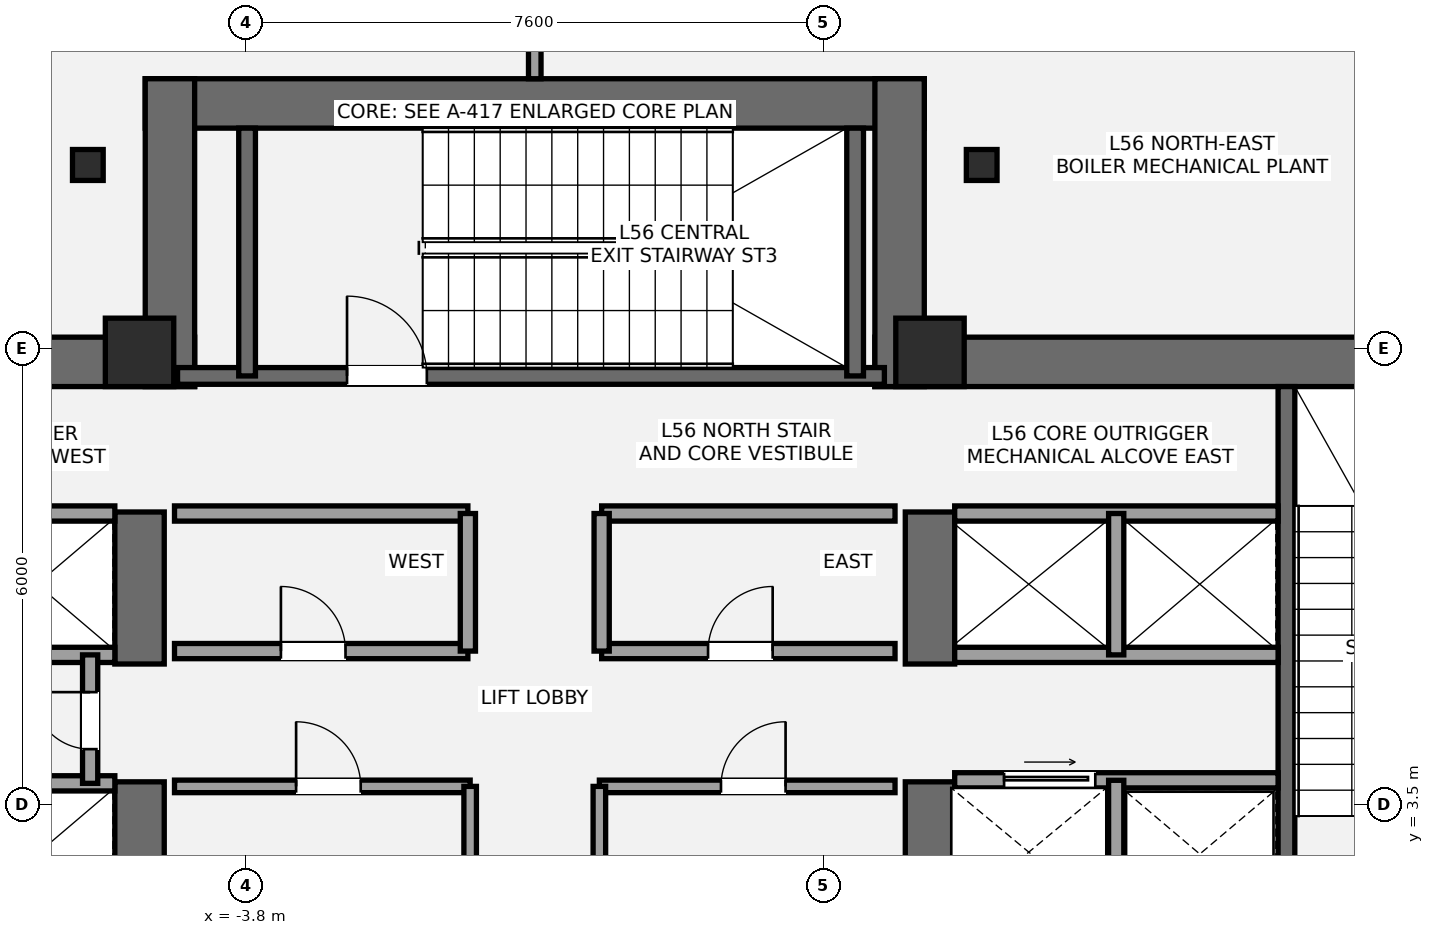
"""IFC4 building model, lengths in metres.
Left out: names, types, materials, properties, quantities, classifications, styles, units other than length and angle.
Written with IfcOpenShell. Run it as: python <this file> out.ifc"""

import sys

from ifc_helpers import new_model, si_unit, direction, frame, frame_2d, origin, origin_2d, place, context, subcontext, project, spatial, rectangle, i_section, extrude, element, fill, save


model = new_model("IFC4")
c1 = context("Model", 3, precision=1e-05, world=origin(), true_north=direction((0.0, 1.0)))
c2 = subcontext(c1, "Body", "Model", "MODEL_VIEW")
j1 = project(units=[si_unit("LENGTHUNIT", "METRE"), si_unit("PLANEANGLEUNIT", "RADIAN")], contexts=[c1])
p1 = place(None, origin())
s1 = spatial("IfcSite", under=j1, at=p1, CompositionType="ELEMENT")
p2 = place(p1, origin())
s2 = spatial("IfcBuilding", under=s1, at=p2, CompositionType="ELEMENT")
p3 = place(p2, frame((0.0, 0.0, 201.4)))
s3 = spatial("IfcBuildingStorey", under=s2, at=p3, CompositionType="ELEMENT", Elevation=201.4)
p4 = place(p3, frame((-13.8, 9.325, 0.0), z_axis=(0.0, 0.0, 1.0), x_axis=(1.0, 0.0, 0.0)))
e1 = element("IfcWall", 1, at=p4, inside=s3, PredefinedType="SHEAR", context=c2, shape_type="SweptSolid", body=[
    extrude(rectangle(XDim=9.325, YDim=0.65, at=frame_2d((4.663, 0.0))), origin(), (0.0, 0.0, 1.0), 4.5),
])
p5 = place(p3, frame((-5.2, 1.2, 0.0), z_axis=(0.0, 0.0, 1.0), x_axis=(0.0, 1.0, 0.0)))
e2 = element("IfcWall", 2, at=p5, inside=s3, PredefinedType="SHEAR", context=c2, shape_type="SweptSolid", body=[
    extrude(rectangle(XDim=2.6, YDim=0.65, at=frame_2d((1.3, 0.0))), origin(), (0.0, 0.0, 1.0), 4.5),
])
p6 = place(p3, frame((-5.2, 5.35, 0.0), z_axis=(0.0, 0.0, 1.0), x_axis=(0.0, 1.0, 0.0)))
e3 = element("IfcWall", 3, at=p6, inside=s3, PredefinedType="SHEAR", context=c2, shape_type="SweptSolid", body=[
    extrude(rectangle(XDim=2.0, YDim=0.65, at=frame_2d((1.0, 0.0))), origin(), (0.0, 0.0, 1.0), 4.5),
])
p7 = place(p3, frame((4.475, 9.325, 0.0), z_axis=(0.0, 0.0, 1.0), x_axis=(1.0, 0.0, 0.0)))
e4 = element("IfcWall", 4, at=p7, inside=s3, PredefinedType="SHEAR", context=c2, shape_type="SweptSolid", body=[
    extrude(rectangle(XDim=9.325, YDim=0.65, at=frame_2d((4.663, 0.0))), origin(), (0.0, 0.0, 1.0), 4.5),
])
p8 = place(p3, frame((5.2, 1.2, 0.0), z_axis=(0.0, 0.0, 1.0), x_axis=(0.0, 1.0, 0.0)))
e5 = element("IfcWall", 5, at=p8, inside=s3, PredefinedType="SHEAR", context=c2, shape_type="SweptSolid", body=[
    extrude(rectangle(XDim=2.6, YDim=0.65, at=frame_2d((1.3, 0.0))), origin(), (0.0, 0.0, 1.0), 4.5),
])
p9 = place(p3, frame((5.2, 5.35, 0.0), z_axis=(0.0, 0.0, 1.0), x_axis=(0.0, 1.0, 0.0)))
e6 = element("IfcWall", 6, at=p9, inside=s3, PredefinedType="SHEAR", context=c2, shape_type="SweptSolid", body=[
    extrude(rectangle(XDim=2.0, YDim=0.65, at=frame_2d((1.0, 0.0))), origin(), (0.0, 0.0, 1.0), 4.5),
])
p10 = place(p3, frame((9.89, 1.85, 0.0), z_axis=(0.0, 0.0, 1.0), x_axis=(0.0, 1.0, 0.0)))
e7 = element("IfcWall", 7, at=p10, inside=s3, PredefinedType="SHEAR", context=c2, shape_type="SweptSolid", body=[
    extrude(rectangle(XDim=7.15, YDim=0.22, at=frame_2d((3.575, 0.0))), origin(), (0.0, 0.0, 1.0), 4.5),
])
p11 = place(p3, frame((-5.125, 12.725, 0.0), z_axis=(0.0, 0.0, 1.0), x_axis=(1.0, 0.0, 0.0)))
e8 = element("IfcWall", 8, at=p11, inside=s3, PredefinedType="SHEAR", context=c2, shape_type="SweptSolid", body=[
    extrude(rectangle(XDim=10.25, YDim=0.65, at=frame_2d((5.125, 0.0))), origin(), (0.0, 0.0, 1.0), 4.5),
])
for number, where, z_axis, x_axis in (
    (9, (-4.8, 9.0, 0.0), (0.0, 0.0, 1.0), (0.0, 1.0, 0.0)),
    (10, (4.8, 9.0, 0.0), (0.0, 0.0, 1.0), (0.0, 1.0, 0.0)),
):
    element("IfcWall", number, at=place(p3, frame(where, z_axis=z_axis, x_axis=x_axis)), inside=s3, PredefinedType="SHEAR", context=c2, shape_type="SweptSolid", body=[
        extrude(rectangle(XDim=4.05, YDim=0.65, at=frame_2d((2.025, 0.0))), origin(), (0.0, 0.0, 1.0), 4.5),
    ])
p12 = place(p3, frame((-4.7, 9.14, 0.0), z_axis=(0.0, 0.0, 1.0), x_axis=(1.0, 0.0, 0.0)))
e11 = element("IfcWall", 11, at=p12, inside=s3, PredefinedType="SHEAR", context=c2, shape_type="SweptSolid", body=[
    extrude(rectangle(XDim=9.3, YDim=0.22, at=frame_2d((4.65, 0.0))), origin(), (0.0, 0.0, 1.0), 4.5),
])
p13 = place(p12, frame((2.23, 0.0, 0.0)))
e12 = element("IfcOpeningElement", 12, at=p13, cuts=e11, PredefinedType="OPENING", context=c2, shape_type="SweptSolid", body=[
    extrude(rectangle(XDim=1.05, YDim=2.15, at=frame_2d((0.525, 1.075))), frame((0.0, 0.12, 0.0), z_axis=(0.0, -1.0, 0.0), x_axis=(1.0, 0.0, 0.0)), (0.0, 0.0, 1.0), 0.24),
])
for number, where, z_axis, x_axis in (
    (13, (-3.785, 9.14, 0.0), (0.0, 0.0, 1.0), (0.0, 1.0, 0.0)),
    (14, (4.215, 9.14, 0.0), (0.0, 0.0, 1.0), (0.0, 1.0, 0.0)),
):
    element("IfcWall", number, at=place(p3, frame(where, z_axis=z_axis, x_axis=x_axis)), inside=s3, PredefinedType="SHEAR", context=c2, shape_type="SweptSolid", body=[
        extrude(rectangle(XDim=3.26, YDim=0.22, at=frame_2d((1.63, 0.0))), origin(), (0.0, 0.0, 1.0), 4.5),
    ])
for number, where, z_axis, x_axis in (
    (15, (-5.2, 9.45, 0.0), (0.0, 0.0, 1.0), (1.0, 0.0, 0.0)),
    (16, (5.2, 9.45, 0.0), (0.0, 0.0, 1.0), (1.0, 0.0, 0.0)),
):
    element("IfcColumn", number, at=place(p3, frame(where, z_axis=z_axis, x_axis=x_axis)), inside=s3, PredefinedType="COLUMN", context=c2, shape_type="SweptSolid", body=[
        extrude(rectangle(XDim=0.9, YDim=0.9, at=origin_2d()), origin(), (0.0, 0.0, 1.0), 4.5),
    ])
for number, where, z_axis, x_axis in (
    (17, (5.88, 11.915, 0.0), (0.0, 0.0, 1.0), (1.0, 0.0, 0.0)),
    (18, (-5.88, 11.915, 0.0), (0.0, 0.0, 1.0), (1.0, 0.0, 0.0)),
):
    element("IfcColumn", number, at=place(p3, frame(where, z_axis=z_axis, x_axis=x_axis)), inside=s3, PredefinedType="COLUMN", context=c2, shape_type="SweptSolid", body=[
        extrude(i_section(OverallWidth=0.404, OverallDepth=0.407, WebThickness=0.027, FlangeThickness=0.044, at=origin_2d()), origin(), (0.0, 0.0, 1.0), 4.5),
    ])
for number, where, z_axis, x_axis in (
    (19, (-9.78, 3.78, 0.0), (0.0, 0.0, 1.0), (1.0, 0.0, 0.0)),
    (20, (-9.78, 5.47, 0.0), (0.0, 0.0, 1.0), (1.0, 0.0, 0.0)),
    (21, (-9.78, 7.33, 0.0), (0.0, 0.0, 1.0), (1.0, 0.0, 0.0)),
):
    element("IfcWall", number, at=place(p3, frame(where, z_axis=z_axis, x_axis=x_axis)), inside=s3, PredefinedType="SOLIDWALL", context=c2, shape_type="SweptSolid", body=[
        extrude(rectangle(XDim=4.255, YDim=0.2, at=frame_2d((2.127, 0.0))), origin(), (0.0, 0.0, 1.0), 4.28),
    ])
p14 = place(p3, frame((-5.85, 3.78, 0.0), z_axis=(0.0, 0.0, 1.0), x_axis=(0.0, 1.0, 0.0)))
e22 = element("IfcWall", 22, at=p14, inside=s3, PredefinedType="SOLIDWALL", context=c2, shape_type="SweptSolid", body=[
    extrude(rectangle(XDim=1.69, YDim=0.2, at=frame_2d((0.845, 0.0))), origin(), (0.0, 0.0, 1.0), 4.28),
])
p15 = place(p14, frame((0.45, 0.0, 0.0)))
e23 = element("IfcOpeningElement", 23, at=p15, cuts=e22, PredefinedType="OPENING", context=c2, shape_type="SweptSolid", body=[
    extrude(rectangle(XDim=0.75, YDim=2.1, at=frame_2d((0.375, 1.05))), frame((0.0, 0.11, 0.0), z_axis=(0.0, -1.0, 0.0), x_axis=(1.0, 0.0, 0.0)), (0.0, 0.0, 1.0), 0.22),
])
p16 = place(p3, frame((5.525, 3.82, 0.0), z_axis=(0.0, 0.0, 1.0), x_axis=(1.0, 0.0, 0.0)))
e24 = element("IfcWall", 24, at=p16, inside=s3, PredefinedType="SOLIDWALL", context=c2, shape_type="SweptSolid", body=[
    extrude(rectangle(XDim=4.255, YDim=0.2, at=frame_2d((2.127, 0.0))), origin(), (0.0, 0.0, 1.0), 4.28),
])
p17 = place(p16, frame((0.65, 0.0, 0.0)))
e25 = element("IfcOpeningElement", 25, at=p17, cuts=e24, PredefinedType="OPENING", context=c2, shape_type="SweptSolid", body=[
    extrude(rectangle(XDim=1.2, YDim=2.2, at=frame_2d((0.6, 1.1))), frame((0.0, 0.11, 0.0), z_axis=(0.0, -1.0, 0.0), x_axis=(1.0, 0.0, 0.0)), (0.0, 0.0, 1.0), 0.22),
])
p18 = place(p3, frame((7.65, 1.85, 0.0), z_axis=(0.0, 0.0, 1.0), x_axis=(0.0, 1.0, 0.0)))
e26 = element("IfcWall", 26, at=p18, inside=s3, PredefinedType="SOLIDWALL", context=c2, shape_type="SweptSolid", body=[
    extrude(rectangle(XDim=1.97, YDim=0.2, at=frame_2d((0.985, 0.0))), origin(), (0.0, 0.0, 1.0), 4.28),
])
for number, where, z_axis, x_axis in (
    (27, (5.525, 5.47, 0.0), (0.0, 0.0, 1.0), (1.0, 0.0, 0.0)),
    (28, (5.525, 7.33, 0.0), (0.0, 0.0, 1.0), (1.0, 0.0, 0.0)),
):
    element("IfcWall", number, at=place(p3, frame(where, z_axis=z_axis, x_axis=x_axis)), inside=s3, PredefinedType="SOLIDWALL", context=c2, shape_type="SweptSolid", body=[
        extrude(rectangle(XDim=4.255, YDim=0.2, at=frame_2d((2.127, 0.0))), origin(), (0.0, 0.0, 1.0), 4.28),
    ])
p19 = place(p3, frame((7.65, 5.47, 0.0), z_axis=(0.0, 0.0, 1.0), x_axis=(0.0, 1.0, 0.0)))
e29 = element("IfcWall", 29, at=p19, inside=s3, PredefinedType="SOLIDWALL", context=c2, shape_type="SweptSolid", body=[
    extrude(rectangle(XDim=1.86, YDim=0.2, at=frame_2d((0.93, 0.0))), origin(), (0.0, 0.0, 1.0), 4.28),
])
p20 = place(p3, frame((-4.74, 3.74, 0.0), z_axis=(0.0, 0.0, 1.0), x_axis=(1.0, 0.0, 0.0)))
e30 = element("IfcWall", 30, at=p20, inside=s3, PredefinedType="PARTITIONING", context=c2, shape_type="SweptSolid", body=[
    extrude(rectangle(XDim=3.89, YDim=0.165, at=frame_2d((1.945, 0.0))), origin(), (0.0, 0.0, 1.0), 4.28),
])
p21 = place(p20, frame((1.6, 0.0, 0.0)))
e31 = element("IfcOpeningElement", 31, at=p21, cuts=e30, PredefinedType="OPENING", context=c2, shape_type="SweptSolid", body=[
    extrude(rectangle(XDim=0.85, YDim=2.1, at=frame_2d((0.425, 1.05))), frame((0.0, 0.093, 0.0), z_axis=(0.0, -1.0, 0.0), x_axis=(1.0, 0.0, 0.0)), (0.0, 0.0, 1.0), 0.185),
])
p22 = place(p3, frame((-0.85, 1.92, 0.0), z_axis=(0.0, 0.0, 1.0), x_axis=(0.0, 1.0, 0.0)))
e32 = element("IfcWall", 32, at=p22, inside=s3, PredefinedType="PARTITIONING", context=c2, shape_type="SweptSolid", body=[
    extrude(rectangle(XDim=1.82, YDim=0.165, at=frame_2d((0.91, 0.0))), origin(), (0.0, 0.0, 1.0), 4.28),
])
p23 = place(p3, frame((0.85, 3.74, 0.0), z_axis=(0.0, 0.0, 1.0), x_axis=(1.0, 0.0, 0.0)))
e33 = element("IfcWall", 33, at=p23, inside=s3, PredefinedType="PARTITIONING", context=c2, shape_type="SweptSolid", body=[
    extrude(rectangle(XDim=3.89, YDim=0.165, at=frame_2d((1.945, 0.0))), origin(), (0.0, 0.0, 1.0), 4.28),
])
p24 = place(p23, frame((1.6, 0.0, 0.0)))
e34 = element("IfcOpeningElement", 34, at=p24, cuts=e33, PredefinedType="OPENING", context=c2, shape_type="SweptSolid", body=[
    extrude(rectangle(XDim=0.85, YDim=2.1, at=frame_2d((0.425, 1.05))), frame((0.0, 0.093, 0.0), z_axis=(0.0, -1.0, 0.0), x_axis=(1.0, 0.0, 0.0)), (0.0, 0.0, 1.0), 0.185),
])
p25 = place(p3, frame((0.85, 1.92, 0.0), z_axis=(0.0, 0.0, 1.0), x_axis=(0.0, 1.0, 0.0)))
e35 = element("IfcWall", 35, at=p25, inside=s3, PredefinedType="PARTITIONING", context=c2, shape_type="SweptSolid", body=[
    extrude(rectangle(XDim=1.82, YDim=0.165, at=frame_2d((0.91, 0.0))), origin(), (0.0, 0.0, 1.0), 4.28),
])
p26 = place(p3, frame((-4.74, 5.52, 0.0), z_axis=(0.0, 0.0, 1.0), x_axis=(1.0, 0.0, 0.0)))
e36 = element("IfcWall", 36, at=p26, inside=s3, PredefinedType="SOLIDWALL", context=c2, shape_type="SweptSolid", body=[
    extrude(rectangle(XDim=3.86, YDim=0.2, at=frame_2d((1.93, 0.0))), origin(), (0.0, 0.0, 1.0), 4.28),
])
p27 = place(p26, frame((1.4, 0.0, 0.0)))
e37 = element("IfcOpeningElement", 37, at=p27, cuts=e36, PredefinedType="OPENING", context=c2, shape_type="SweptSolid", body=[
    extrude(rectangle(XDim=0.85, YDim=2.1, at=frame_2d((0.425, 1.05))), frame((0.0, 0.11, 0.0), z_axis=(0.0, -1.0, 0.0), x_axis=(1.0, 0.0, 0.0)), (0.0, 0.0, 1.0), 0.22),
])
p28 = place(p3, frame((0.88, 5.52, 0.0), z_axis=(0.0, 0.0, 1.0), x_axis=(1.0, 0.0, 0.0)))
e38 = element("IfcWall", 38, at=p28, inside=s3, PredefinedType="SOLIDWALL", context=c2, shape_type="SweptSolid", body=[
    extrude(rectangle(XDim=3.86, YDim=0.2, at=frame_2d((1.93, 0.0))), origin(), (0.0, 0.0, 1.0), 4.28),
])
p29 = place(p28, frame((1.4, 0.0, 0.0)))
e39 = element("IfcOpeningElement", 39, at=p29, cuts=e38, PredefinedType="OPENING", context=c2, shape_type="SweptSolid", body=[
    extrude(rectangle(XDim=0.85, YDim=2.1, at=frame_2d((0.425, 1.05))), frame((0.0, 0.11, 0.0), z_axis=(0.0, -1.0, 0.0), x_axis=(1.0, 0.0, 0.0)), (0.0, 0.0, 1.0), 0.22),
])
for number, where, z_axis, x_axis in (
    (40, (-4.74, 7.33, 0.0), (0.0, 0.0, 1.0), (1.0, 0.0, 0.0)),
    (41, (0.88, 7.33, 0.0), (0.0, 0.0, 1.0), (1.0, 0.0, 0.0)),
):
    element("IfcWall", number, at=place(p3, frame(where, z_axis=z_axis, x_axis=x_axis)), inside=s3, PredefinedType="SOLIDWALL", context=c2, shape_type="SweptSolid", body=[
        extrude(rectangle(XDim=3.86, YDim=0.2, at=frame_2d((1.93, 0.0))), origin(), (0.0, 0.0, 1.0), 4.28),
    ])
for number, where, z_axis, x_axis in (
    (42, (-0.88, 5.52, 0.0), (0.0, 0.0, 1.0), (0.0, 1.0, 0.0)),
    (43, (0.88, 5.52, 0.0), (0.0, 0.0, 1.0), (0.0, 1.0, 0.0)),
):
    element("IfcWall", number, at=place(p3, frame(where, z_axis=z_axis, x_axis=x_axis)), inside=s3, PredefinedType="SOLIDWALL", context=c2, shape_type="SweptSolid", body=[
        extrude(rectangle(XDim=1.81, YDim=0.2, at=frame_2d((0.905, 0.0))), origin(), (0.0, 0.0, 1.0), 4.28),
    ])
p30 = place(p3, frame((0.0, 13.05, 0.0), z_axis=(0.0, 0.0, 1.0), x_axis=(0.0, 1.0, 0.0)))
e44 = element("IfcWall", 44, at=p30, inside=s3, PredefinedType="PARTITIONING", context=c2, shape_type="SweptSolid", body=[
    extrude(rectangle(XDim=2.226, YDim=0.165, at=frame_2d((1.113, 0.0))), origin(), (0.0, 0.0, 1.0), 4.28),
])
p31 = place(p13, origin())
e45 = element("IfcDoor", 45, at=p31, inside=s3, OperationType="SINGLE_SWING_LEFT", PredefinedType="DOOR", context=c2, shape_type="SweptSolid", body=[
    extrude(rectangle(XDim=1.05, YDim=2.15, at=frame_2d((0.525, 1.075))), frame((0.0, 0.025, 0.0), z_axis=(0.0, -1.0, 0.0), x_axis=(1.0, 0.0, 0.0)), (0.0, 0.0, 1.0), 0.05),
])
fill(e12, e45)
p32 = place(p15, origin())
e46 = element("IfcDoor", 46, at=p32, inside=s3, OperationType="SINGLE_SWING_RIGHT", PredefinedType="DOOR", context=c2, shape_type="SweptSolid", body=[
    extrude(rectangle(XDim=0.75, YDim=2.1, at=frame_2d((0.375, 1.05))), frame((0.0, 0.025, 0.0), z_axis=(0.0, -1.0, 0.0), x_axis=(1.0, 0.0, 0.0)), (0.0, 0.0, 1.0), 0.05),
])
fill(e23, e46)
p33 = place(p17, origin())
e47 = element("IfcDoor", 47, at=p33, inside=s3, OperationType="SLIDING_TO_RIGHT", PredefinedType="DOOR", context=c2, shape_type="SweptSolid", body=[
    extrude(rectangle(XDim=1.2, YDim=2.2, at=frame_2d((0.6, 1.1))), frame((0.0, 0.025, 0.0), z_axis=(0.0, -1.0, 0.0), x_axis=(1.0, 0.0, 0.0)), (0.0, 0.0, 1.0), 0.05),
])
fill(e25, e47)
p34 = place(p21, origin())
e48 = element("IfcDoor", 48, at=p34, inside=s3, OperationType="SINGLE_SWING_LEFT", PredefinedType="DOOR", context=c2, shape_type="SweptSolid", body=[
    extrude(rectangle(XDim=0.85, YDim=2.1, at=frame_2d((0.425, 1.05))), frame((0.0, 0.025, 0.0), z_axis=(0.0, -1.0, 0.0), x_axis=(1.0, 0.0, 0.0)), (0.0, 0.0, 1.0), 0.05),
])
fill(e31, e48)
p35 = place(p24, origin())
e49 = element("IfcDoor", 49, at=p35, inside=s3, OperationType="SINGLE_SWING_RIGHT", PredefinedType="DOOR", context=c2, shape_type="SweptSolid", body=[
    extrude(rectangle(XDim=0.85, YDim=2.1, at=frame_2d((0.425, 1.05))), frame((0.0, 0.025, 0.0), z_axis=(0.0, -1.0, 0.0), x_axis=(1.0, 0.0, 0.0)), (0.0, 0.0, 1.0), 0.05),
])
fill(e34, e49)
p36 = place(p27, origin())
e50 = element("IfcDoor", 50, at=p36, inside=s3, OperationType="SINGLE_SWING_LEFT", PredefinedType="DOOR", context=c2, shape_type="SweptSolid", body=[
    extrude(rectangle(XDim=0.85, YDim=2.1, at=frame_2d((0.425, 1.05))), frame((0.0, 0.025, 0.0), z_axis=(0.0, -1.0, 0.0), x_axis=(1.0, 0.0, 0.0)), (0.0, 0.0, 1.0), 0.05),
])
fill(e37, e50)
p37 = place(p29, origin())
e51 = element("IfcDoor", 51, at=p37, inside=s3, OperationType="SINGLE_SWING_RIGHT", PredefinedType="DOOR", context=c2, shape_type="SweptSolid", body=[
    extrude(rectangle(XDim=0.85, YDim=2.1, at=frame_2d((0.425, 1.05))), frame((0.0, 0.025, 0.0), z_axis=(0.0, -1.0, 0.0), x_axis=(1.0, 0.0, 0.0)), (0.0, 0.0, 1.0), 0.05),
])
fill(e39, e51)
save(model, sys.argv[1])
